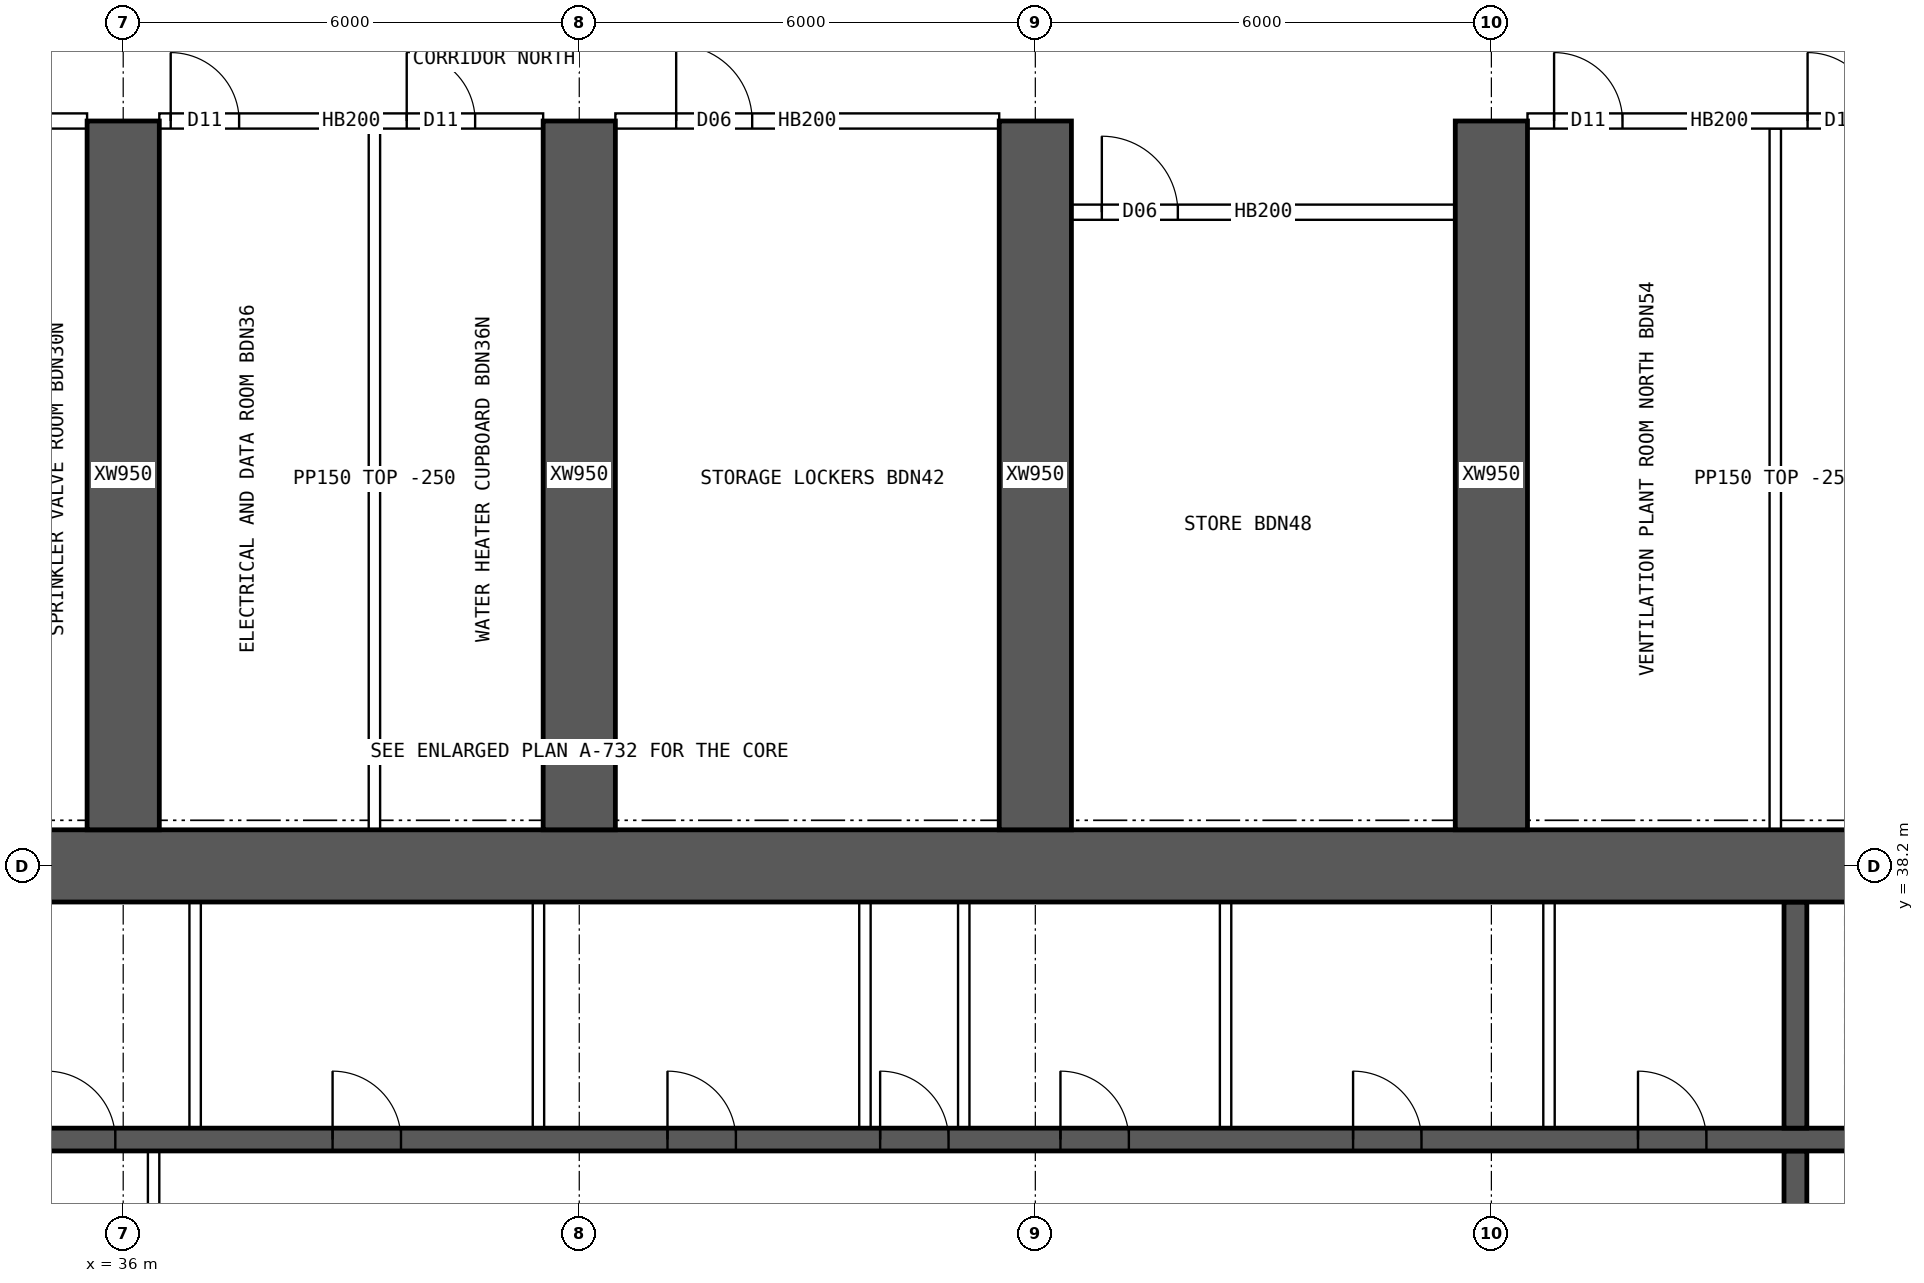
"""IFC4 building model, lengths in metres.
Left out: names, types, materials, properties, quantities, classifications, styles, units other than length and angle.
Written with IfcOpenShell. Run it as: python <this file> out.ifc"""

import sys

from ifc_helpers import new_model, si_unit, direction, frame, frame_2d, origin, place, context, subcontext, project, spatial, rectangle, extrude, element, fill, save


model = new_model("IFC4")
c1 = context("Model", 3, precision=1e-05, world=origin(), true_north=direction((0.0, 1.0)))
c2 = subcontext(c1, "Body", "Model", "MODEL_VIEW")
j1 = project(units=[si_unit("LENGTHUNIT", "METRE"), si_unit("PLANEANGLEUNIT", "RADIAN")], contexts=[c1])
p1 = place(None, origin())
s1 = spatial("IfcSite", under=j1, at=p1, CompositionType="ELEMENT")
p2 = place(p1, origin())
s2 = spatial("IfcBuilding", under=s1, at=p2, CompositionType="ELEMENT")
p3 = place(p2, frame((0.0, 0.0, 118.15)))
s3 = spatial("IfcBuildingStorey", under=s2, at=p3, CompositionType="ELEMENT", Elevation=118.15)
p4 = place(p3, frame((18.0, 38.2, 0.0), z_axis=(0.0, 0.0, 1.0), x_axis=(1.0, 0.0, 0.0)))
e1 = element("IfcWall", 1, at=p4, inside=s3, PredefinedType="SHEAR", context=c2, shape_type="SweptSolid", body=[
    extrude(rectangle(XDim=48.0, YDim=0.95, at=frame_2d((24.0, 0.0))), origin(), (0.0, 0.0, 1.0), 3.75),
])
p5 = place(p3, frame((18.475, 34.6, 0.0), z_axis=(0.0, 0.0, 1.0), x_axis=(1.0, 0.0, 0.0)))
e2 = element("IfcWall", 2, at=p5, inside=s3, PredefinedType="SHEAR", context=c2, shape_type="SweptSolid", body=[
    extrude(rectangle(XDim=47.05, YDim=0.3, at=frame_2d((23.525, 0.0))), origin(), (0.0, 0.0, 1.0), 3.75),
])
p6 = place(p5, frame((0.9, 0.0, 0.0)))
e3 = element("IfcOpeningElement", 3, at=p6, cuts=e2, PredefinedType="OPENING", context=c2, shape_type="SweptSolid", body=[
    extrude(rectangle(XDim=1.1, YDim=2.1, at=frame_2d((0.55, 1.05))), frame((0.0, 0.16, 0.0), z_axis=(0.0, -1.0, 0.0), x_axis=(1.0, 0.0, 0.0)), (0.0, 0.0, 1.0), 0.32),
])
p7 = place(p5, frame((45.05, 0.0, 0.0)))
e4 = element("IfcOpeningElement", 4, at=p7, cuts=e2, PredefinedType="OPENING", context=c2, shape_type="SweptSolid", body=[
    extrude(rectangle(XDim=1.1, YDim=2.1, at=frame_2d((0.55, 1.05))), frame((0.0, 0.16, 0.0), z_axis=(0.0, -1.0, 0.0), x_axis=(1.0, 0.0, 0.0)), (0.0, 0.0, 1.0), 0.32),
])
p8 = place(p5, frame((4.125, 0.0, 0.0)))
e5 = element("IfcOpeningElement", 5, at=p8, cuts=e2, PredefinedType="OPENING", context=c2, shape_type="SweptSolid", body=[
    extrude(rectangle(XDim=0.9, YDim=2.1, at=frame_2d((0.45, 1.05))), frame((0.0, 0.16, 0.0), z_axis=(0.0, -1.0, 0.0), x_axis=(1.0, 0.0, 0.0)), (0.0, 0.0, 1.0), 0.32),
])
p9 = place(p5, frame((42.025, 0.0, 0.0)))
e6 = element("IfcOpeningElement", 6, at=p9, cuts=e2, PredefinedType="OPENING", context=c2, shape_type="SweptSolid", body=[
    extrude(rectangle(XDim=0.9, YDim=2.1, at=frame_2d((0.45, 1.05))), frame((0.0, 0.16, 0.0), z_axis=(0.0, -1.0, 0.0), x_axis=(1.0, 0.0, 0.0)), (0.0, 0.0, 1.0), 0.32),
])
p10 = place(p5, frame((8.9, 0.0, 0.0)))
e7 = element("IfcOpeningElement", 7, at=p10, cuts=e2, PredefinedType="OPENING", context=c2, shape_type="SweptSolid", body=[
    extrude(rectangle(XDim=0.9, YDim=2.1, at=frame_2d((0.45, 1.05))), frame((0.0, 0.16, 0.0), z_axis=(0.0, -1.0, 0.0), x_axis=(1.0, 0.0, 0.0)), (0.0, 0.0, 1.0), 0.32),
])
p11 = place(p5, frame((12.874, 0.0, 0.0)))
e8 = element("IfcOpeningElement", 8, at=p11, cuts=e2, PredefinedType="OPENING", context=c2, shape_type="SweptSolid", body=[
    extrude(rectangle(XDim=0.9, YDim=2.1, at=frame_2d((0.45, 1.05))), frame((0.0, 0.16, 0.0), z_axis=(0.0, -1.0, 0.0), x_axis=(1.0, 0.0, 0.0)), (0.0, 0.0, 1.0), 0.32),
])
p12 = place(p5, frame((16.521, 0.0, 0.0)))
e9 = element("IfcOpeningElement", 9, at=p12, cuts=e2, PredefinedType="OPENING", context=c2, shape_type="SweptSolid", body=[
    extrude(rectangle(XDim=0.9, YDim=2.1, at=frame_2d((0.45, 1.05))), frame((0.0, 0.16, 0.0), z_axis=(0.0, -1.0, 0.0), x_axis=(1.0, 0.0, 0.0)), (0.0, 0.0, 1.0), 0.32),
])
p13 = place(p5, frame((20.28, 0.0, 0.0)))
e10 = element("IfcOpeningElement", 10, at=p13, cuts=e2, PredefinedType="OPENING", context=c2, shape_type="SweptSolid", body=[
    extrude(rectangle(XDim=0.9, YDim=2.1, at=frame_2d((0.45, 1.05))), frame((0.0, 0.16, 0.0), z_axis=(0.0, -1.0, 0.0), x_axis=(1.0, 0.0, 0.0)), (0.0, 0.0, 1.0), 0.32),
])
p14 = place(p5, frame((24.686, 0.0, 0.0)))
e11 = element("IfcOpeningElement", 11, at=p14, cuts=e2, PredefinedType="OPENING", context=c2, shape_type="SweptSolid", body=[
    extrude(rectangle(XDim=0.9, YDim=2.1, at=frame_2d((0.45, 1.05))), frame((0.0, 0.16, 0.0), z_axis=(0.0, -1.0, 0.0), x_axis=(1.0, 0.0, 0.0)), (0.0, 0.0, 1.0), 0.32),
])
p15 = place(p5, frame((27.483, 0.0, 0.0)))
e12 = element("IfcOpeningElement", 12, at=p15, cuts=e2, PredefinedType="OPENING", context=c2, shape_type="SweptSolid", body=[
    extrude(rectangle(XDim=0.9, YDim=2.1, at=frame_2d((0.45, 1.05))), frame((0.0, 0.16, 0.0), z_axis=(0.0, -1.0, 0.0), x_axis=(1.0, 0.0, 0.0)), (0.0, 0.0, 1.0), 0.32),
])
p16 = place(p5, frame((29.856, 0.0, 0.0)))
e13 = element("IfcOpeningElement", 13, at=p16, cuts=e2, PredefinedType="OPENING", context=c2, shape_type="SweptSolid", body=[
    extrude(rectangle(XDim=0.9, YDim=2.1, at=frame_2d((0.45, 1.05))), frame((0.0, 0.16, 0.0), z_axis=(0.0, -1.0, 0.0), x_axis=(1.0, 0.0, 0.0)), (0.0, 0.0, 1.0), 0.32),
])
p17 = place(p5, frame((33.706, 0.0, 0.0)))
e14 = element("IfcOpeningElement", 14, at=p17, cuts=e2, PredefinedType="OPENING", context=c2, shape_type="SweptSolid", body=[
    extrude(rectangle(XDim=0.9, YDim=2.1, at=frame_2d((0.45, 1.05))), frame((0.0, 0.16, 0.0), z_axis=(0.0, -1.0, 0.0), x_axis=(1.0, 0.0, 0.0)), (0.0, 0.0, 1.0), 0.32),
])
p18 = place(p5, frame((37.454, 0.0, 0.0)))
e15 = element("IfcOpeningElement", 15, at=p18, cuts=e2, PredefinedType="OPENING", context=c2, shape_type="SweptSolid", body=[
    extrude(rectangle(XDim=0.9, YDim=2.1, at=frame_2d((0.45, 1.05))), frame((0.0, 0.16, 0.0), z_axis=(0.0, -1.0, 0.0), x_axis=(1.0, 0.0, 0.0)), (0.0, 0.0, 1.0), 0.32),
])
p19 = place(p3, frame((58.0, 30.55, 0.0), z_axis=(0.0, 0.0, 1.0), x_axis=(0.0, 1.0, 0.0)))
e16 = element("IfcWall", 16, at=p19, inside=s3, PredefinedType="SHEAR", context=c2, shape_type="SweptSolid", body=[
    extrude(rectangle(XDim=3.9, YDim=0.3, at=frame_2d((1.95, 0.0))), origin(), (0.0, 0.0, 1.0), 3.75),
])
p20 = place(p19, frame((1.4, 0.0, 0.0)))
e17 = element("IfcOpeningElement", 17, at=p20, cuts=e16, PredefinedType="OPENING", context=c2, shape_type="SweptSolid", body=[
    extrude(rectangle(XDim=1.2, YDim=2.1, at=frame_2d((0.6, 1.05))), frame((0.0, 0.16, 0.0), z_axis=(0.0, -1.0, 0.0), x_axis=(1.0, 0.0, 0.0)), (0.0, 0.0, 1.0), 0.32),
])
p21 = place(p3, frame((58.0, 34.75, 0.0), z_axis=(0.0, 0.0, 1.0), x_axis=(0.0, 1.0, 0.0)))
e18 = element("IfcWall", 18, at=p21, inside=s3, PredefinedType="SHEAR", context=c2, shape_type="SweptSolid", body=[
    extrude(rectangle(XDim=2.975, YDim=0.3, at=frame_2d((1.488, 0.0))), origin(), (0.0, 0.0, 1.0), 3.75),
])
for number, where, z_axis, x_axis in (
    (19, (36.0, 38.675, 0.0), (0.0, 0.0, 1.0), (0.0, 1.0, 0.0)),
    (20, (42.0, 38.675, 0.0), (0.0, 0.0, 1.0), (0.0, 1.0, 0.0)),
    (21, (48.0, 38.675, 0.0), (0.0, 0.0, 1.0), (0.0, 1.0, 0.0)),
    (22, (54.0, 38.675, 0.0), (0.0, 0.0, 1.0), (0.0, 1.0, 0.0)),
):
    element("IfcWall", number, at=place(p3, frame(where, z_axis=z_axis, x_axis=x_axis)), inside=s3, PredefinedType="SHEAR", context=c2, shape_type="SweptSolid", body=[
        extrude(rectangle(XDim=9.325, YDim=0.95, at=frame_2d((4.663, 0.0))), origin(), (0.0, 0.0, 1.0), 3.75),
    ])
p22 = place(p3, frame((36.4, 30.55, 0.0), z_axis=(0.0, 0.0, 1.0), x_axis=(0.0, 1.0, 0.0)))
e23 = element("IfcWall", 23, at=p22, inside=s3, PredefinedType="SOLIDWALL", context=c2, shape_type="SweptSolid", body=[
    extrude(rectangle(XDim=3.9, YDim=0.15, at=frame_2d((1.95, 0.0))), origin(), (0.0, 0.0, 1.0), 3.5),
])
p23 = place(p22, frame((1.15, 0.0, 0.0)))
e24 = element("IfcOpeningElement", 24, at=p23, cuts=e23, PredefinedType="OPENING", context=c2, shape_type="SweptSolid", body=[
    extrude(rectangle(XDim=1.6, YDim=2.1, at=frame_2d((0.8, 1.05))), frame((0.0, 0.085, 0.0), z_axis=(0.0, -1.0, 0.0), x_axis=(1.0, 0.0, 0.0)), (0.0, 0.0, 1.0), 0.17),
])
for number, where, z_axis, x_axis in (
    (25, (36.946, 34.75, 0.0), (0.0, 0.0, 1.0), (0.0, 1.0, 0.0)),
    (26, (41.463, 34.75, 0.0), (0.0, 0.0, 1.0), (0.0, 1.0, 0.0)),
    (27, (45.758, 34.75, 0.0), (0.0, 0.0, 1.0), (0.0, 1.0, 0.0)),
    (28, (47.058, 34.75, 0.0), (0.0, 0.0, 1.0), (0.0, 1.0, 0.0)),
    (29, (50.503, 34.75, 0.0), (0.0, 0.0, 1.0), (0.0, 1.0, 0.0)),
    (30, (54.758, 34.75, 0.0), (0.0, 0.0, 1.0), (0.0, 1.0, 0.0)),
):
    element("IfcWall", number, at=place(p3, frame(where, z_axis=z_axis, x_axis=x_axis)), inside=s3, PredefinedType="SOLIDWALL", context=c2, shape_type="SweptSolid", body=[
        extrude(rectangle(XDim=2.975, YDim=0.15, at=frame_2d((1.488, 0.0))), origin(), (0.0, 0.0, 1.0), 3.5),
    ])
p24 = place(p3, frame((30.475, 48.0, 0.0), z_axis=(0.0, 0.0, 1.0), x_axis=(1.0, 0.0, 0.0)))
e31 = element("IfcWall", 31, at=p24, inside=s3, PredefinedType="SOLIDWALL", context=c2, shape_type="SweptSolid", body=[
    extrude(rectangle(XDim=5.05, YDim=0.2, at=frame_2d((2.525, 0.0))), origin(), (0.0, 0.0, 1.0), 3.5),
])
p25 = place(p24, frame((0.35, 0.0, 0.0)))
e32 = element("IfcOpeningElement", 32, at=p25, cuts=e31, PredefinedType="OPENING", context=c2, shape_type="SweptSolid", body=[
    extrude(rectangle(XDim=0.9, YDim=2.1, at=frame_2d((0.45, 1.05))), frame((0.0, 0.11, 0.0), z_axis=(0.0, -1.0, 0.0), x_axis=(1.0, 0.0, 0.0)), (0.0, 0.0, 1.0), 0.22),
])
p26 = place(p24, frame((3.635, 0.0, 0.0)))
e33 = element("IfcOpeningElement", 33, at=p26, cuts=e31, PredefinedType="OPENING", context=c2, shape_type="SweptSolid", body=[
    extrude(rectangle(XDim=0.9, YDim=2.1, at=frame_2d((0.45, 1.05))), frame((0.0, 0.11, 0.0), z_axis=(0.0, -1.0, 0.0), x_axis=(1.0, 0.0, 0.0)), (0.0, 0.0, 1.0), 0.22),
])
p27 = place(p3, frame((36.475, 48.0, 0.0), z_axis=(0.0, 0.0, 1.0), x_axis=(1.0, 0.0, 0.0)))
e34 = element("IfcWall", 34, at=p27, inside=s3, PredefinedType="SOLIDWALL", context=c2, shape_type="SweptSolid", body=[
    extrude(rectangle(XDim=5.05, YDim=0.2, at=frame_2d((2.525, 0.0))), origin(), (0.0, 0.0, 1.0), 3.5),
])
p28 = place(p27, frame((0.15, 0.0, 0.0)))
e35 = element("IfcOpeningElement", 35, at=p28, cuts=e34, PredefinedType="OPENING", context=c2, shape_type="SweptSolid", body=[
    extrude(rectangle(XDim=0.9, YDim=2.1, at=frame_2d((0.45, 1.05))), frame((0.0, 0.11, 0.0), z_axis=(0.0, -1.0, 0.0), x_axis=(1.0, 0.0, 0.0)), (0.0, 0.0, 1.0), 0.22),
])
p29 = place(p27, frame((3.255, 0.0, 0.0)))
e36 = element("IfcOpeningElement", 36, at=p29, cuts=e34, PredefinedType="OPENING", context=c2, shape_type="SweptSolid", body=[
    extrude(rectangle(XDim=0.9, YDim=2.1, at=frame_2d((0.45, 1.05))), frame((0.0, 0.11, 0.0), z_axis=(0.0, -1.0, 0.0), x_axis=(1.0, 0.0, 0.0)), (0.0, 0.0, 1.0), 0.22),
])
p30 = place(p3, frame((42.475, 48.0, 0.0), z_axis=(0.0, 0.0, 1.0), x_axis=(1.0, 0.0, 0.0)))
e37 = element("IfcWall", 37, at=p30, inside=s3, PredefinedType="SOLIDWALL", context=c2, shape_type="SweptSolid", body=[
    extrude(rectangle(XDim=5.05, YDim=0.2, at=frame_2d((2.525, 0.0))), origin(), (0.0, 0.0, 1.0), 3.5),
])
p31 = place(p30, frame((0.8, 0.0, 0.0)))
e38 = element("IfcOpeningElement", 38, at=p31, cuts=e37, PredefinedType="OPENING", context=c2, shape_type="SweptSolid", body=[
    extrude(rectangle(XDim=1.0, YDim=2.1, at=frame_2d((0.5, 1.05))), frame((0.0, 0.11, 0.0), z_axis=(0.0, -1.0, 0.0), x_axis=(1.0, 0.0, 0.0)), (0.0, 0.0, 1.0), 0.22),
])
p32 = place(p3, frame((54.475, 48.0, 0.0), z_axis=(0.0, 0.0, 1.0), x_axis=(1.0, 0.0, 0.0)))
e39 = element("IfcWall", 39, at=p32, inside=s3, PredefinedType="SOLIDWALL", context=c2, shape_type="SweptSolid", body=[
    extrude(rectangle(XDim=5.05, YDim=0.2, at=frame_2d((2.525, 0.0))), origin(), (0.0, 0.0, 1.0), 3.5),
])
p33 = place(p32, frame((0.35, 0.0, 0.0)))
e40 = element("IfcOpeningElement", 40, at=p33, cuts=e39, PredefinedType="OPENING", context=c2, shape_type="SweptSolid", body=[
    extrude(rectangle(XDim=0.9, YDim=2.1, at=frame_2d((0.45, 1.05))), frame((0.0, 0.11, 0.0), z_axis=(0.0, -1.0, 0.0), x_axis=(1.0, 0.0, 0.0)), (0.0, 0.0, 1.0), 0.22),
])
p34 = place(p32, frame((3.685, 0.0, 0.0)))
e41 = element("IfcOpeningElement", 41, at=p34, cuts=e39, PredefinedType="OPENING", context=c2, shape_type="SweptSolid", body=[
    extrude(rectangle(XDim=0.9, YDim=2.1, at=frame_2d((0.45, 1.05))), frame((0.0, 0.11, 0.0), z_axis=(0.0, -1.0, 0.0), x_axis=(1.0, 0.0, 0.0)), (0.0, 0.0, 1.0), 0.22),
])
p35 = place(p3, frame((39.305, 38.675, 0.0), z_axis=(0.0, 0.0, 1.0), x_axis=(0.0, 1.0, 0.0)))
e42 = element("IfcWall", 42, at=p35, inside=s3, PredefinedType="PARTITIONING", context=c2, shape_type="SweptSolid", body=[
    extrude(rectangle(XDim=9.225, YDim=0.15, at=frame_2d((4.612, 0.0))), origin(), (0.0, 0.0, 1.0), 3.5),
])
p36 = place(p3, frame((48.475, 46.8, 0.0), z_axis=(0.0, 0.0, 1.0), x_axis=(1.0, 0.0, 0.0)))
e43 = element("IfcWall", 43, at=p36, inside=s3, PredefinedType="SOLIDWALL", context=c2, shape_type="SweptSolid", body=[
    extrude(rectangle(XDim=5.05, YDim=0.2, at=frame_2d((2.525, 0.0))), origin(), (0.0, 0.0, 1.0), 3.5),
])
p37 = place(p36, frame((0.4, 0.0, 0.0)))
e44 = element("IfcOpeningElement", 44, at=p37, cuts=e43, PredefinedType="OPENING", context=c2, shape_type="SweptSolid", body=[
    extrude(rectangle(XDim=1.0, YDim=2.1, at=frame_2d((0.5, 1.05))), frame((0.0, 0.11, 0.0), z_axis=(0.0, -1.0, 0.0), x_axis=(1.0, 0.0, 0.0)), (0.0, 0.0, 1.0), 0.22),
])
p38 = place(p3, frame((57.735, 38.675, 0.0), z_axis=(0.0, 0.0, 1.0), x_axis=(0.0, 1.0, 0.0)))
e45 = element("IfcWall", 45, at=p38, inside=s3, PredefinedType="PARTITIONING", context=c2, shape_type="SweptSolid", body=[
    extrude(rectangle(XDim=9.225, YDim=0.15, at=frame_2d((4.612, 0.0))), origin(), (0.0, 0.0, 1.0), 3.5),
])
p39 = place(p12, origin())
e46 = element("IfcDoor", 46, at=p39, inside=s3, OperationType="SINGLE_SWING_LEFT", PredefinedType="DOOR", context=c2, shape_type="SweptSolid", body=[
    extrude(rectangle(XDim=0.9, YDim=2.1, at=frame_2d((0.45, 1.05))), frame((0.0, 0.025, 0.0), z_axis=(0.0, -1.0, 0.0), x_axis=(1.0, 0.0, 0.0)), (0.0, 0.0, 1.0), 0.05),
])
fill(e9, e46)
p40 = place(p13, origin())
e47 = element("IfcDoor", 47, at=p40, inside=s3, OperationType="SINGLE_SWING_LEFT", PredefinedType="DOOR", context=c2, shape_type="SweptSolid", body=[
    extrude(rectangle(XDim=0.9, YDim=2.1, at=frame_2d((0.45, 1.05))), frame((0.0, 0.025, 0.0), z_axis=(0.0, -1.0, 0.0), x_axis=(1.0, 0.0, 0.0)), (0.0, 0.0, 1.0), 0.05),
])
fill(e10, e47)
p41 = place(p14, origin())
e48 = element("IfcDoor", 48, at=p41, inside=s3, OperationType="SINGLE_SWING_LEFT", PredefinedType="DOOR", context=c2, shape_type="SweptSolid", body=[
    extrude(rectangle(XDim=0.9, YDim=2.1, at=frame_2d((0.45, 1.05))), frame((0.0, 0.025, 0.0), z_axis=(0.0, -1.0, 0.0), x_axis=(1.0, 0.0, 0.0)), (0.0, 0.0, 1.0), 0.05),
])
fill(e11, e48)
p42 = place(p15, origin())
e49 = element("IfcDoor", 49, at=p42, inside=s3, OperationType="SINGLE_SWING_LEFT", PredefinedType="DOOR", context=c2, shape_type="SweptSolid", body=[
    extrude(rectangle(XDim=0.9, YDim=2.1, at=frame_2d((0.45, 1.05))), frame((0.0, 0.025, 0.0), z_axis=(0.0, -1.0, 0.0), x_axis=(1.0, 0.0, 0.0)), (0.0, 0.0, 1.0), 0.05),
])
fill(e12, e49)
p43 = place(p16, origin())
e50 = element("IfcDoor", 50, at=p43, inside=s3, OperationType="SINGLE_SWING_LEFT", PredefinedType="DOOR", context=c2, shape_type="SweptSolid", body=[
    extrude(rectangle(XDim=0.9, YDim=2.1, at=frame_2d((0.45, 1.05))), frame((0.0, 0.025, 0.0), z_axis=(0.0, -1.0, 0.0), x_axis=(1.0, 0.0, 0.0)), (0.0, 0.0, 1.0), 0.05),
])
fill(e13, e50)
p44 = place(p17, origin())
e51 = element("IfcDoor", 51, at=p44, inside=s3, OperationType="SINGLE_SWING_LEFT", PredefinedType="DOOR", context=c2, shape_type="SweptSolid", body=[
    extrude(rectangle(XDim=0.9, YDim=2.1, at=frame_2d((0.45, 1.05))), frame((0.0, 0.025, 0.0), z_axis=(0.0, -1.0, 0.0), x_axis=(1.0, 0.0, 0.0)), (0.0, 0.0, 1.0), 0.05),
])
fill(e14, e51)
p45 = place(p18, origin())
e52 = element("IfcDoor", 52, at=p45, inside=s3, OperationType="SINGLE_SWING_LEFT", PredefinedType="DOOR", context=c2, shape_type="SweptSolid", body=[
    extrude(rectangle(XDim=0.9, YDim=2.1, at=frame_2d((0.45, 1.05))), frame((0.0, 0.025, 0.0), z_axis=(0.0, -1.0, 0.0), x_axis=(1.0, 0.0, 0.0)), (0.0, 0.0, 1.0), 0.05),
])
fill(e15, e52)
p46 = place(p28, origin())
e53 = element("IfcDoor", 53, at=p46, inside=s3, OperationType="SINGLE_SWING_LEFT", PredefinedType="DOOR", context=c2, shape_type="SweptSolid", body=[
    extrude(rectangle(XDim=0.9, YDim=2.1, at=frame_2d((0.45, 1.05))), frame((0.0, 0.025, 0.0), z_axis=(0.0, -1.0, 0.0), x_axis=(1.0, 0.0, 0.0)), (0.0, 0.0, 1.0), 0.05),
])
fill(e35, e53)
p47 = place(p29, origin())
e54 = element("IfcDoor", 54, at=p47, inside=s3, OperationType="SINGLE_SWING_LEFT", PredefinedType="DOOR", context=c2, shape_type="SweptSolid", body=[
    extrude(rectangle(XDim=0.9, YDim=2.1, at=frame_2d((0.45, 1.05))), frame((0.0, 0.025, 0.0), z_axis=(0.0, -1.0, 0.0), x_axis=(1.0, 0.0, 0.0)), (0.0, 0.0, 1.0), 0.05),
])
fill(e36, e54)
p48 = place(p31, origin())
e55 = element("IfcDoor", 55, at=p48, inside=s3, OperationType="SINGLE_SWING_LEFT", PredefinedType="DOOR", context=c2, shape_type="SweptSolid", body=[
    extrude(rectangle(XDim=1.0, YDim=2.1, at=frame_2d((0.5, 1.05))), frame((0.0, 0.025, 0.0), z_axis=(0.0, -1.0, 0.0), x_axis=(1.0, 0.0, 0.0)), (0.0, 0.0, 1.0), 0.05),
])
fill(e38, e55)
p49 = place(p37, origin())
e56 = element("IfcDoor", 56, at=p49, inside=s3, OperationType="SINGLE_SWING_LEFT", PredefinedType="DOOR", context=c2, shape_type="SweptSolid", body=[
    extrude(rectangle(XDim=1.0, YDim=2.1, at=frame_2d((0.5, 1.05))), frame((0.0, 0.025, 0.0), z_axis=(0.0, -1.0, 0.0), x_axis=(1.0, 0.0, 0.0)), (0.0, 0.0, 1.0), 0.05),
])
fill(e44, e56)
p50 = place(p33, origin())
e57 = element("IfcDoor", 57, at=p50, inside=s3, OperationType="SINGLE_SWING_LEFT", PredefinedType="DOOR", context=c2, shape_type="SweptSolid", body=[
    extrude(rectangle(XDim=0.9, YDim=2.1, at=frame_2d((0.45, 1.05))), frame((0.0, 0.025, 0.0), z_axis=(0.0, -1.0, 0.0), x_axis=(1.0, 0.0, 0.0)), (0.0, 0.0, 1.0), 0.05),
])
fill(e40, e57)
p51 = place(p34, origin())
e58 = element("IfcDoor", 58, at=p51, inside=s3, OperationType="SINGLE_SWING_LEFT", PredefinedType="DOOR", context=c2, shape_type="SweptSolid", body=[
    extrude(rectangle(XDim=0.9, YDim=2.1, at=frame_2d((0.45, 1.05))), frame((0.0, 0.025, 0.0), z_axis=(0.0, -1.0, 0.0), x_axis=(1.0, 0.0, 0.0)), (0.0, 0.0, 1.0), 0.05),
])
fill(e41, e58)
save(model, sys.argv[1])
